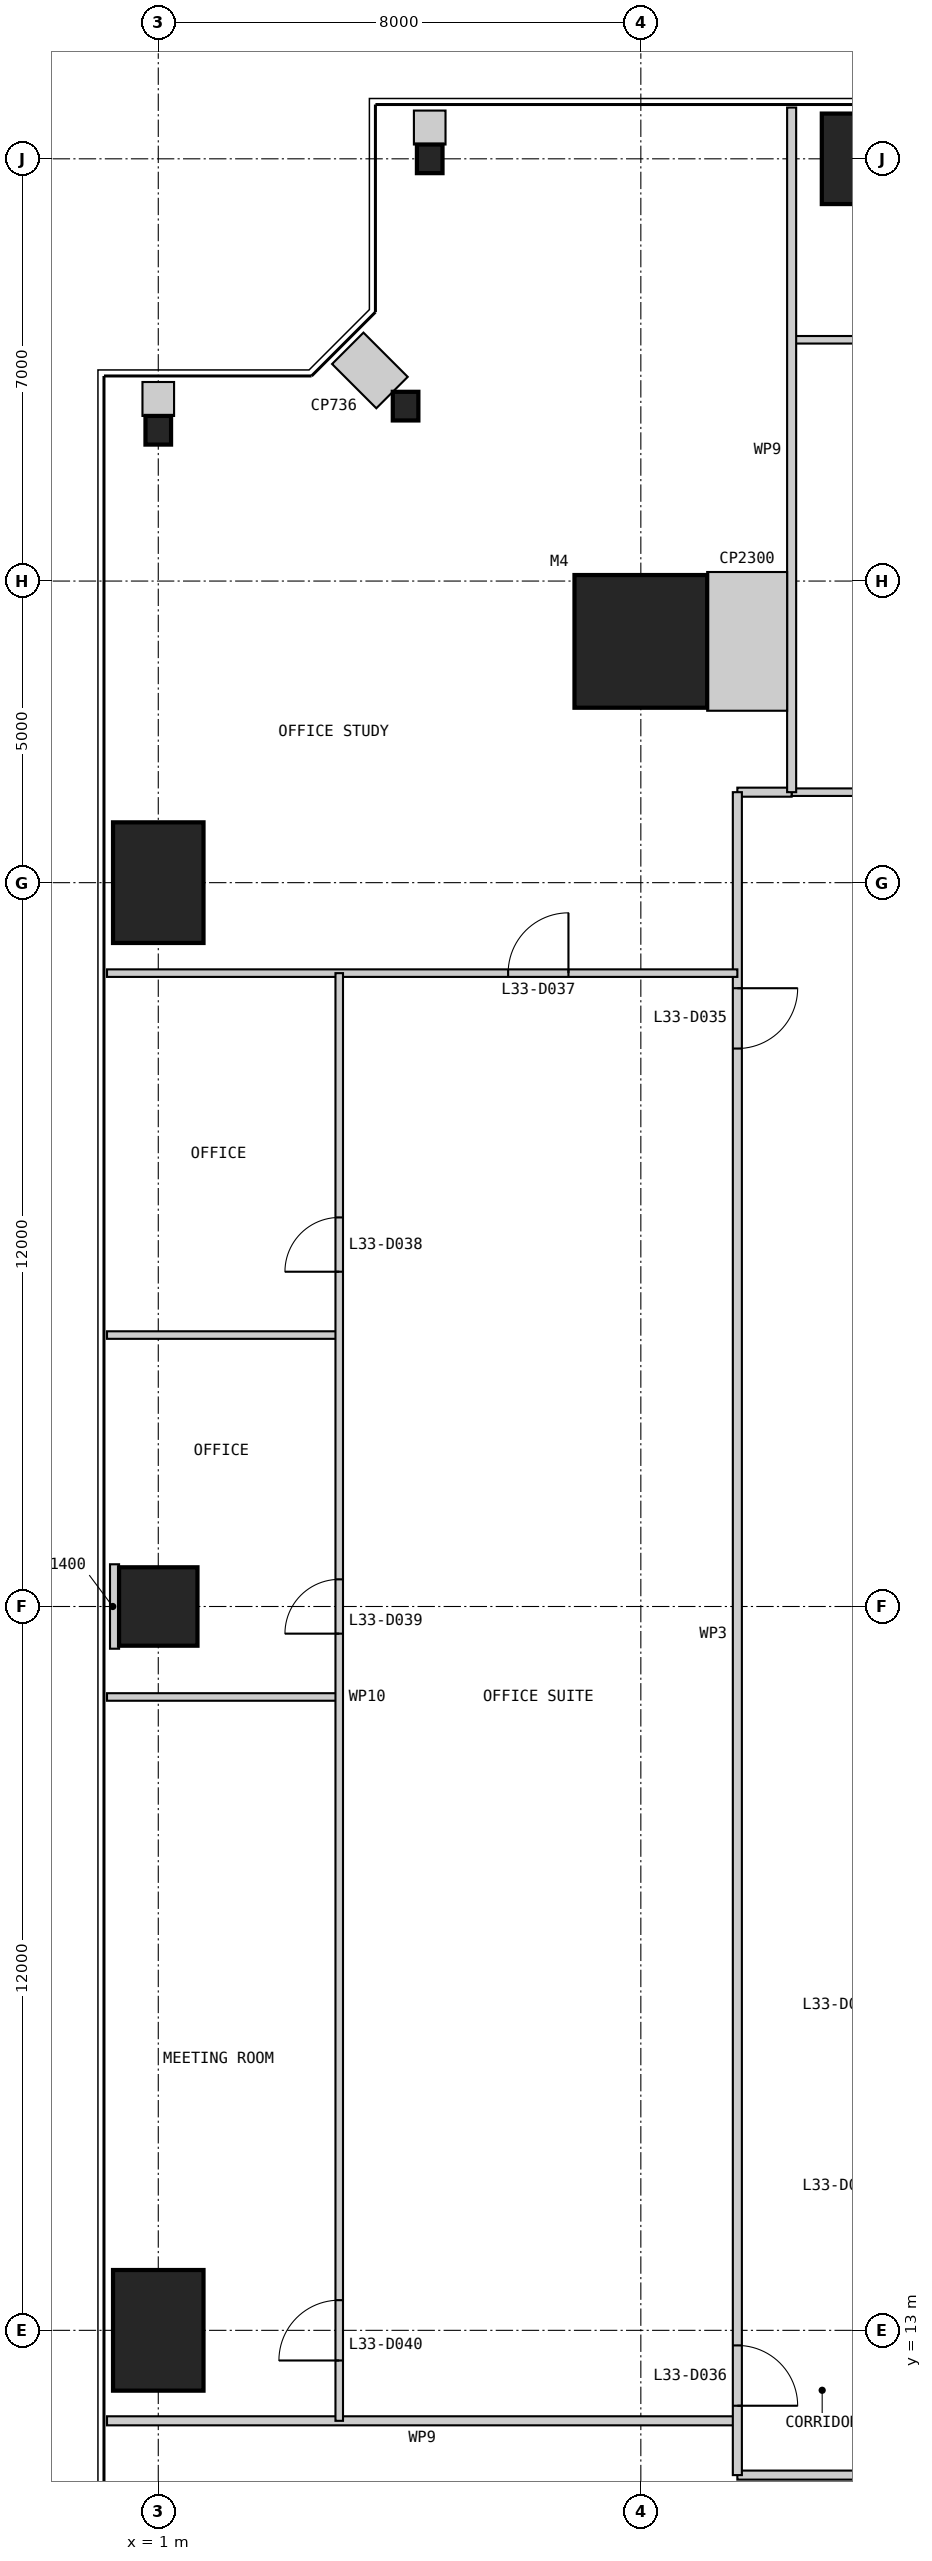
"""IFC4 building model, lengths in metres.
Left out: names, types, materials, properties, quantities, classifications, styles, units other than length and angle.
Written with IfcOpenShell. Run it as: python <this file> out.ifc"""

import sys

from ifc_helpers import new_model, si_unit, direction, frame, frame_2d, origin, origin_2d, place, context, subcontext, project, spatial, rectangle, i_section, extrude, element, fill, save


model = new_model("IFC4")
c1 = context("Model", 3, precision=1e-05, world=origin(), true_north=direction((0.0, 1.0)))
c2 = subcontext(c1, "Body", "Model", "MODEL_VIEW")
j1 = project(units=[si_unit("LENGTHUNIT", "METRE"), si_unit("PLANEANGLEUNIT", "RADIAN")], contexts=[c1])
p1 = place(None, origin())
s1 = spatial("IfcSite", under=j1, at=p1, CompositionType="ELEMENT")
p2 = place(p1, origin())
s2 = spatial("IfcBuilding", under=s1, at=p2, CompositionType="ELEMENT")
p3 = place(p2, frame((0.0, 0.0, 142.4)))
s3 = spatial("IfcBuildingStorey", under=s2, at=p3, CompositionType="ELEMENT", Elevation=142.4)
p4 = place(p3, frame((9.0, 41.0, 0.0), z_axis=(0.0, 0.0, 1.0), x_axis=(1.0, 0.0, 0.0)))
e1 = element("IfcColumn", 1, at=p4, inside=s3, PredefinedType="COLUMN", context=c2, shape_type="SweptSolid", body=[
    extrude(rectangle(XDim=2.2, YDim=2.2, at=origin_2d()), origin(), (0.0, 0.0, 1.0), 4.0),
])
p5 = place(p3, frame((13.0, 49.0, 0.0), z_axis=(0.0, 0.0, 1.0), x_axis=(1.0, 0.0, 0.0)))
e2 = element("IfcColumn", 2, at=p5, inside=s3, PredefinedType="COLUMN", context=c2, shape_type="SweptSolid", body=[
    extrude(rectangle(XDim=2.0, YDim=1.5, at=origin_2d()), origin(), (0.0, 0.0, 1.0), 4.0),
])
for number, where, z_axis, x_axis in (
    (3, (5.5, 49.0, 0.0), (0.0, 0.0, 1.0), (1.0, 0.0, 0.0)),
    (4, (5.1, 44.9, 0.0), (0.0, 0.0, 1.0), (1.0, 0.0, 0.0)),
    (5, (1.0, 44.5, 0.0), (0.0, 0.0, 1.0), (1.0, 0.0, 0.0)),
):
    element("IfcColumn", number, at=place(p3, frame(where, z_axis=z_axis, x_axis=x_axis)), inside=s3, PredefinedType="COLUMN", context=c2, shape_type="SweptSolid", body=[
        extrude(i_section(OverallWidth=0.424, OverallDepth=0.475, WebThickness=0.048, FlangeThickness=0.077, at=origin_2d()), origin(), (0.0, 0.0, 1.0), 4.0),
    ])
p6 = place(p3, frame((1.0, 37.0, 0.0), z_axis=(0.0, 0.0, 1.0), x_axis=(1.0, 0.0, 0.0)))
e6 = element("IfcColumn", 6, at=p6, inside=s3, PredefinedType="COLUMN", context=c2, shape_type="SweptSolid", body=[
    extrude(rectangle(XDim=1.5, YDim=2.0, at=origin_2d()), origin(), (0.0, 0.0, 1.0), 4.0),
])
p7 = place(p3, frame((1.0, 25.0, 0.0), z_axis=(0.0, 0.0, 1.0), x_axis=(1.0, 0.0, 0.0)))
e7 = element("IfcColumn", 7, at=p7, inside=s3, PredefinedType="COLUMN", context=c2, shape_type="SweptSolid", body=[
    extrude(rectangle(XDim=1.3, YDim=1.3, at=origin_2d()), origin(), (0.0, 0.0, 1.0), 4.0),
])
p8 = place(p3, frame((1.0, 13.0, 0.0), z_axis=(0.0, 0.0, 1.0), x_axis=(1.0, 0.0, 0.0)))
e8 = element("IfcColumn", 8, at=p8, inside=s3, PredefinedType="COLUMN", context=c2, shape_type="SweptSolid", body=[
    extrude(rectangle(XDim=1.5, YDim=2.0, at=origin_2d()), origin(), (0.0, 0.0, 1.0), 4.0),
])
p9 = place(p3, frame((10.6, 10.6, 0.0), z_axis=(0.0, 0.0, 1.0), x_axis=(1.0, 0.0, 0.0)))
e9 = element("IfcWall", 9, at=p9, inside=s3, PredefinedType="PARTITIONING", context=c2, shape_type="SweptSolid", body=[
    extrude(rectangle(XDim=28.8, YDim=0.15, at=frame_2d((14.4, 0.0))), origin(), (0.0, 0.0, 1.0), 3.85),
])
p10 = place(p9, frame((4.15, 0.0, 0.0)))
e10 = element("IfcOpeningElement", 10, at=p10, cuts=e9, PredefinedType="OPENING", context=c2, shape_type="SweptSolid", body=[
    extrude(rectangle(XDim=1.0, YDim=2.2, at=frame_2d((0.5, 1.1))), frame((0.0, 0.085, 0.0), z_axis=(0.0, -1.0, 0.0), x_axis=(1.0, 0.0, 0.0)), (0.0, 0.0, 1.0), 0.17),
])
p11 = place(p9, frame((26.65, 0.0, 0.0)))
e11 = element("IfcOpeningElement", 11, at=p11, cuts=e9, PredefinedType="OPENING", context=c2, shape_type="SweptSolid", body=[
    extrude(rectangle(XDim=1.0, YDim=2.2, at=frame_2d((0.5, 1.1))), frame((0.0, 0.085, 0.0), z_axis=(0.0, -1.0, 0.0), x_axis=(1.0, 0.0, 0.0)), (0.0, 0.0, 1.0), 0.17),
])
p12 = place(p3, frame((0.15, 11.5, 0.0), z_axis=(0.0, 0.0, 1.0), x_axis=(1.0, 0.0, 0.0)))
e12 = element("IfcWall", 12, at=p12, inside=s3, PredefinedType="PARTITIONING", context=c2, shape_type="SweptSolid", body=[
    extrude(rectangle(XDim=10.45, YDim=0.15, at=frame_2d((5.225, 0.0))), origin(), (0.0, 0.0, 1.0), 3.85),
])
p13 = place(p3, frame((17.5, 46.0, 0.0), z_axis=(0.0, 0.0, 1.0), x_axis=(-1.0, 0.0, 0.0)))
e13 = element("IfcWall", 13, at=p13, inside=s3, PredefinedType="PARTITIONING", context=c2, shape_type="SweptSolid", body=[
    extrude(rectangle(XDim=6.0, YDim=0.125, at=frame_2d((3.0, 0.0))), origin(), (0.0, 0.0, 1.0), 3.85),
])
p14 = place(p3, frame((14.5, 38.5, 0.0), z_axis=(0.0, 0.0, 1.0), x_axis=(-1.0, 0.0, 0.0)))
e14 = element("IfcWall", 14, at=p14, inside=s3, PredefinedType="PARTITIONING", context=c2, shape_type="SweptSolid", body=[
    extrude(rectangle(XDim=3.0, YDim=0.125, at=frame_2d((1.5, 0.0))), origin(), (0.0, 0.0, 1.0), 3.85),
])
p15 = place(p3, frame((11.5, 38.5, 0.0), z_axis=(0.0, 0.0, 1.0), x_axis=(-1.0, 0.0, 0.0)))
e15 = element("IfcWall", 15, at=p15, inside=s3, PredefinedType="PARTITIONING", context=c2, shape_type="SweptSolid", body=[
    extrude(rectangle(XDim=0.9, YDim=0.15, at=frame_2d((0.45, 0.0))), origin(), (0.0, 0.0, 1.0), 3.85),
])
p16 = place(p3, frame((10.6, 38.5, 0.0), z_axis=(0.0, 0.0, 1.0), x_axis=(0.0, -1.0, 0.0)))
e16 = element("IfcWall", 16, at=p16, inside=s3, PredefinedType="PARTITIONING", context=c2, shape_type="SweptSolid", body=[
    extrude(rectangle(XDim=27.9, YDim=0.15, at=frame_2d((13.95, 0.0))), origin(), (0.0, 0.0, 1.0), 3.85),
])
p17 = place(p16, frame((3.25, 0.0, 0.0)))
e17 = element("IfcOpeningElement", 17, at=p17, cuts=e16, PredefinedType="OPENING", context=c2, shape_type="SweptSolid", body=[
    extrude(rectangle(XDim=1.0, YDim=2.2, at=frame_2d((0.5, 1.1))), frame((0.0, 0.085, 0.0), z_axis=(0.0, -1.0, 0.0), x_axis=(1.0, 0.0, 0.0)), (0.0, 0.0, 1.0), 0.17),
])
p18 = place(p16, frame((25.75, 0.0, 0.0)))
e18 = element("IfcOpeningElement", 18, at=p18, cuts=e16, PredefinedType="OPENING", context=c2, shape_type="SweptSolid", body=[
    extrude(rectangle(XDim=1.0, YDim=2.2, at=frame_2d((0.5, 1.1))), frame((0.0, 0.085, 0.0), z_axis=(0.0, -1.0, 0.0), x_axis=(1.0, 0.0, 0.0)), (0.0, 0.0, 1.0), 0.17),
])
p19 = place(p3, frame((11.5, 49.85, 0.0), z_axis=(0.0, 0.0, 1.0), x_axis=(0.0, -1.0, 0.0)))
e19 = element("IfcWall", 19, at=p19, inside=s3, PredefinedType="PARTITIONING", context=c2, shape_type="SweptSolid", body=[
    extrude(rectangle(XDim=11.35, YDim=0.15, at=frame_2d((5.675, 0.0))), origin(), (0.0, 0.0, 1.0), 3.85),
])
p20 = place(p3, frame((0.15, 35.5, 0.0), z_axis=(0.0, 0.0, 1.0), x_axis=(1.0, 0.0, 0.0)))
e20 = element("IfcWall", 20, at=p20, inside=s3, PredefinedType="PARTITIONING", context=c2, shape_type="SweptSolid", body=[
    extrude(rectangle(XDim=10.45, YDim=0.125, at=frame_2d((5.225, 0.0))), origin(), (0.0, 0.0, 1.0), 3.85),
])
p21 = place(p20, frame((6.65, 0.0, 0.0)))
e21 = element("IfcOpeningElement", 21, at=p21, cuts=e20, PredefinedType="OPENING", context=c2, shape_type="SweptSolid", body=[
    extrude(rectangle(XDim=1.0, YDim=2.2, at=frame_2d((0.5, 1.1))), frame((0.0, 0.073, 0.0), z_axis=(0.0, -1.0, 0.0), x_axis=(1.0, 0.0, 0.0)), (0.0, 0.0, 1.0), 0.145),
])
for number, where, z_axis, x_axis in (
    (22, (0.15, 29.5, 0.0), (0.0, 0.0, 1.0), (1.0, 0.0, 0.0)),
    (23, (0.15, 23.5, 0.0), (0.0, 0.0, 1.0), (1.0, 0.0, 0.0)),
):
    element("IfcWall", number, at=place(p3, frame(where, z_axis=z_axis, x_axis=x_axis)), inside=s3, PredefinedType="PARTITIONING", context=c2, shape_type="SweptSolid", body=[
        extrude(rectangle(XDim=3.85, YDim=0.125, at=frame_2d((1.925, 0.0))), origin(), (0.0, 0.0, 1.0), 3.85),
    ])
p22 = place(p3, frame((4.0, 35.5, 0.0), z_axis=(0.0, 0.0, 1.0), x_axis=(0.0, -1.0, 0.0)))
e24 = element("IfcWall", 24, at=p22, inside=s3, PredefinedType="PARTITIONING", context=c2, shape_type="SweptSolid", body=[
    extrude(rectangle(XDim=24.0, YDim=0.125, at=frame_2d((12.0, 0.0))), origin(), (0.0, 0.0, 1.0), 3.238),
])
p23 = place(p22, frame((4.05, 0.0, 0.0)))
e25 = element("IfcOpeningElement", 25, at=p23, cuts=e24, PredefinedType="OPENING", context=c2, shape_type="SweptSolid", body=[
    extrude(rectangle(XDim=0.9, YDim=2.2, at=frame_2d((0.45, 1.1))), frame((0.0, 0.073, 0.0), z_axis=(0.0, -1.0, 0.0), x_axis=(1.0, 0.0, 0.0)), (0.0, 0.0, 1.0), 0.145),
])
p24 = place(p22, frame((10.05, 0.0, 0.0)))
e26 = element("IfcOpeningElement", 26, at=p24, cuts=e24, PredefinedType="OPENING", context=c2, shape_type="SweptSolid", body=[
    extrude(rectangle(XDim=0.9, YDim=2.2, at=frame_2d((0.45, 1.1))), frame((0.0, 0.073, 0.0), z_axis=(0.0, -1.0, 0.0), x_axis=(1.0, 0.0, 0.0)), (0.0, 0.0, 1.0), 0.145),
])
p25 = place(p22, frame((22.0, 0.0, 0.0)))
e27 = element("IfcOpeningElement", 27, at=p25, cuts=e24, PredefinedType="OPENING", context=c2, shape_type="SweptSolid", body=[
    extrude(rectangle(XDim=1.0, YDim=2.2, at=frame_2d((0.5, 1.1))), frame((0.0, 0.073, 0.0), z_axis=(0.0, -1.0, 0.0), x_axis=(1.0, 0.0, 0.0)), (0.0, 0.0, 1.0), 0.145),
])
p26 = place(p3, frame((11.425, 41.0, 0.0), z_axis=(0.0, 0.0, 1.0), x_axis=(-1.0, 0.0, 0.0)))
e28 = element("IfcWall", 28, at=p26, inside=s3, PredefinedType="PARTITIONING", context=c2, shape_type="SweptSolid", body=[
    extrude(rectangle(XDim=1.325, YDim=2.3, at=frame_2d((0.663, 0.0))), origin(), (0.0, 0.0, 1.0), 3.85),
])
p27 = place(p3, frame((5.5, 49.8, 0.0), z_axis=(0.0, 0.0, 1.0), x_axis=(0.0, -1.0, 0.0)))
e29 = element("IfcWall", 29, at=p27, inside=s3, PredefinedType="PARTITIONING", context=c2, shape_type="SweptSolid", body=[
    extrude(rectangle(XDim=0.562, YDim=0.524, at=frame_2d((0.281, 0.0))), origin(), (0.0, 0.0, 1.0), 3.85),
])
p28 = place(p3, frame((4.141, 45.859, 0.0), z_axis=(0.0, 0.0, 1.0), x_axis=(0.707106781187, -0.707106781187, 0.0)))
e30 = element("IfcWall", 30, at=p28, inside=s3, PredefinedType="PARTITIONING", context=c2, shape_type="SweptSolid", body=[
    extrude(rectangle(XDim=1.038, YDim=0.736, at=frame_2d((0.519, 0.0))), origin(), (0.0, 0.0, 1.0), 3.85),
])
p29 = place(p3, frame((1.0, 45.3, 0.0), z_axis=(0.0, 0.0, 1.0), x_axis=(0.0, -1.0, 0.0)))
e31 = element("IfcWall", 31, at=p29, inside=s3, PredefinedType="PARTITIONING", context=c2, shape_type="SweptSolid", body=[
    extrude(rectangle(XDim=0.562, YDim=0.524, at=frame_2d((0.281, 0.0))), origin(), (0.0, 0.0, 1.0), 3.85),
])
p30 = place(p3, frame((0.2, 25.0, 0.0), z_axis=(0.0, 0.0, 1.0), x_axis=(1.0, 0.0, 0.0)))
e32 = element("IfcWall", 32, at=p30, inside=s3, PredefinedType="PARTITIONING", context=c2, shape_type="SweptSolid", body=[
    extrude(rectangle(XDim=0.15, YDim=1.4, at=frame_2d((0.075, 0.0))), origin(), (0.0, 0.0, 1.0), 3.85),
])
p31 = place(p17, origin())
e33 = element("IfcDoor", 33, at=p31, inside=s3, OperationType="SINGLE_SWING_LEFT", PredefinedType="DOOR", context=c2, shape_type="SweptSolid", body=[
    extrude(rectangle(XDim=1.0, YDim=2.2, at=frame_2d((0.5, 1.1))), frame((0.0, 0.025, 0.0), z_axis=(0.0, -1.0, 0.0), x_axis=(1.0, 0.0, 0.0)), (0.0, 0.0, 1.0), 0.05),
])
fill(e17, e33)
p32 = place(p18, origin())
e34 = element("IfcDoor", 34, at=p32, inside=s3, OperationType="SINGLE_SWING_RIGHT", PredefinedType="DOOR", context=c2, shape_type="SweptSolid", body=[
    extrude(rectangle(XDim=1.0, YDim=2.2, at=frame_2d((0.5, 1.1))), frame((0.0, 0.025, 0.0), z_axis=(0.0, -1.0, 0.0), x_axis=(1.0, 0.0, 0.0)), (0.0, 0.0, 1.0), 0.05),
])
fill(e18, e34)
p33 = place(p21, origin())
e35 = element("IfcDoor", 35, at=p33, inside=s3, OperationType="SINGLE_SWING_RIGHT", PredefinedType="DOOR", context=c2, shape_type="SweptSolid", body=[
    extrude(rectangle(XDim=1.0, YDim=2.2, at=frame_2d((0.5, 1.1))), frame((0.0, 0.025, 0.0), z_axis=(0.0, -1.0, 0.0), x_axis=(1.0, 0.0, 0.0)), (0.0, 0.0, 1.0), 0.05),
])
fill(e21, e35)
p34 = place(p23, frame((0.9, 0.0, 0.0), z_axis=(0.0, 0.0, 1.0), x_axis=(-1.0, 0.0, 0.0)))
e36 = element("IfcDoor", 36, at=p34, inside=s3, OperationType="SINGLE_SWING_LEFT", PredefinedType="DOOR", context=c2, shape_type="SweptSolid", body=[
    extrude(rectangle(XDim=0.9, YDim=2.2, at=frame_2d((0.45, 1.1))), frame((0.0, 0.025, 0.0), z_axis=(0.0, -1.0, 0.0), x_axis=(1.0, 0.0, 0.0)), (0.0, 0.0, 1.0), 0.05),
])
fill(e25, e36)
p35 = place(p24, frame((0.9, 0.0, 0.0), z_axis=(0.0, 0.0, 1.0), x_axis=(-1.0, 0.0, 0.0)))
e37 = element("IfcDoor", 37, at=p35, inside=s3, OperationType="SINGLE_SWING_LEFT", PredefinedType="DOOR", context=c2, shape_type="SweptSolid", body=[
    extrude(rectangle(XDim=0.9, YDim=2.2, at=frame_2d((0.45, 1.1))), frame((0.0, 0.025, 0.0), z_axis=(0.0, -1.0, 0.0), x_axis=(1.0, 0.0, 0.0)), (0.0, 0.0, 1.0), 0.05),
])
fill(e26, e37)
p36 = place(p25, frame((1.0, 0.0, 0.0), z_axis=(0.0, 0.0, 1.0), x_axis=(-1.0, 0.0, 0.0)))
e38 = element("IfcDoor", 38, at=p36, inside=s3, OperationType="SINGLE_SWING_LEFT", PredefinedType="DOOR", context=c2, shape_type="SweptSolid", body=[
    extrude(rectangle(XDim=1.0, YDim=2.2, at=frame_2d((0.5, 1.1))), frame((0.0, 0.025, 0.0), z_axis=(0.0, -1.0, 0.0), x_axis=(1.0, 0.0, 0.0)), (0.0, 0.0, 1.0), 0.05),
])
fill(e27, e38)
save(model, sys.argv[1])
